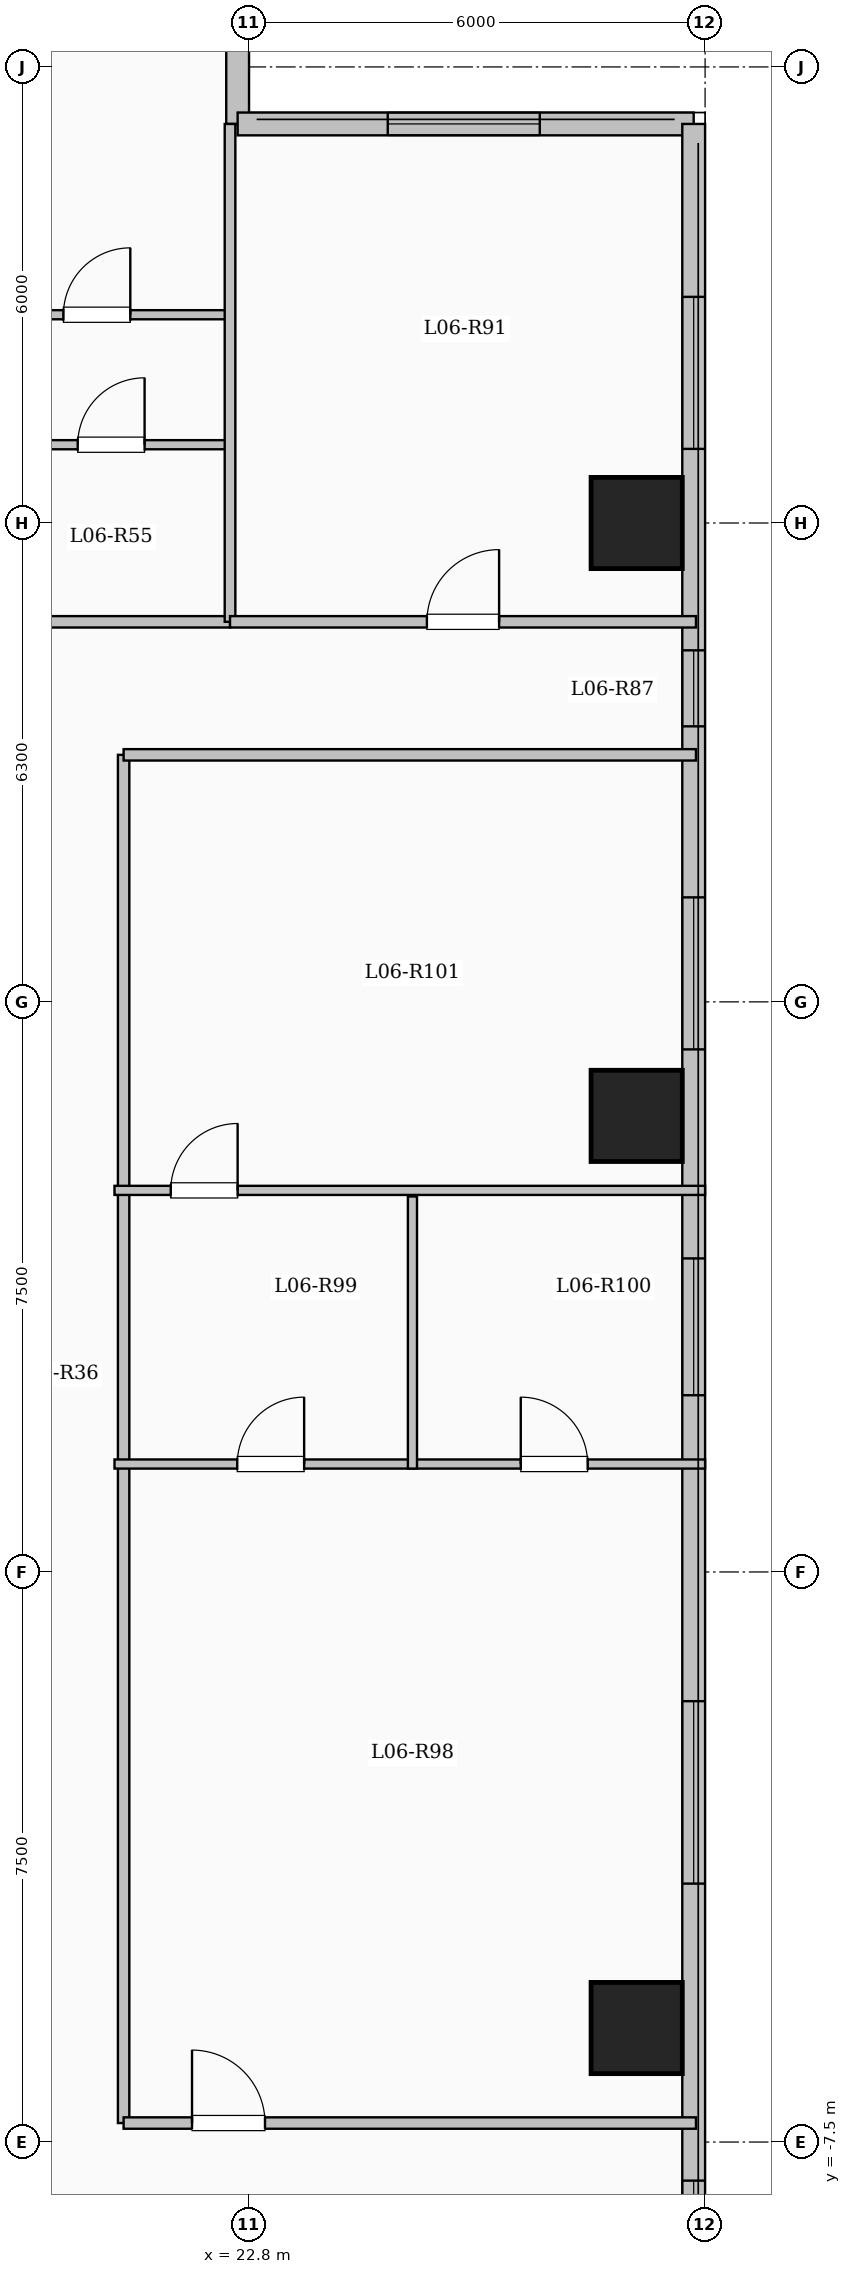
"""IFC4 building model, lengths in metres.
Left out: names, types, materials, properties, quantities, classifications, styles, units other than length and angle.
Written with IfcOpenShell. Run it as: python <this file> out.ifc"""

import sys

from ifc_helpers import new_model, si_unit, direction, frame, frame_2d, origin, origin_2d, place, context, subcontext, project, spatial, rectangle, extrude, element, fill, save


model = new_model("IFC4")
c1 = context("Model", 3, precision=1e-05, world=origin(), true_north=direction((0.0, 1.0)))
c2 = subcontext(c1, "Body", "Model", "MODEL_VIEW")
j1 = project(units=[si_unit("LENGTHUNIT", "METRE"), si_unit("PLANEANGLEUNIT", "RADIAN")], contexts=[c1])
p1 = place(None, origin())
s1 = spatial("IfcSite", under=j1, at=p1, CompositionType="ELEMENT")
p2 = place(p1, origin())
s2 = spatial("IfcBuilding", under=s1, at=p2, CompositionType="ELEMENT")
p3 = place(p2, frame((0.0, 0.0, 27.35)))
s3 = spatial("IfcBuildingStorey", under=s2, at=p3, CompositionType="ELEMENT", Elevation=27.35)
for number, where, z_axis, x_axis in (
    (1, (27.9, -6.0, 0.0), (0.0, 0.0, 1.0), (1.0, 0.0, 0.0)),
    (2, (27.9, 6.0, 0.0), (0.0, 0.0, 1.0), (1.0, 0.0, 0.0)),
    (3, (27.9, 13.8, 0.0), (0.0, 0.0, 1.0), (1.0, 0.0, 0.0)),
):
    element("IfcColumn", number, at=place(p3, frame(where, z_axis=z_axis, x_axis=x_axis)), inside=s3, PredefinedType="COLUMN", context=c2, shape_type="SweptSolid", body=[
        extrude(rectangle(XDim=1.2, YDim=1.2, at=origin_2d()), origin(), (0.0, 0.0, 1.0), 3.35),
    ])
p4 = place(p3, frame((22.65, 23.55, 0.0), z_axis=(0.0, 0.0, 1.0), x_axis=(0.0, -1.0, 0.0)))
e4 = element("IfcWall", 4, at=p4, inside=s3, PredefinedType="SOLIDWALL", context=c2, shape_type="SweptSolid", body=[
    extrude(rectangle(XDim=4.5, YDim=0.3, at=frame_2d((2.25, 0.0))), origin(), (0.0, 0.0, 1.0), 3.1),
])
p5 = place(p4, frame((1.367, 0.0, 0.9)))
e5 = element("IfcOpeningElement", 5, at=p5, cuts=e4, PredefinedType="OPENING", context=c2, shape_type="SweptSolid", body=[
    extrude(rectangle(XDim=1.8, YDim=1.65, at=frame_2d((0.9, 0.825))), frame((0.0, 0.16, 0.0), z_axis=(0.0, -1.0, 0.0), x_axis=(1.0, 0.0, 0.0)), (0.0, 0.0, 1.0), 0.32),
])
p6 = place(p3, frame((22.65, 19.05, 0.0), z_axis=(0.0, 0.0, 1.0), x_axis=(1.0, 0.0, 0.0)))
e6 = element("IfcWall", 6, at=p6, inside=s3, PredefinedType="SOLIDWALL", context=c2, shape_type="SweptSolid", body=[
    extrude(rectangle(XDim=6.0, YDim=0.3, at=frame_2d((3.0, 0.0))), origin(), (0.0, 0.0, 1.0), 3.1),
])
p7 = place(p6, frame((1.975, 0.0, 0.9)))
e7 = element("IfcOpeningElement", 7, at=p7, cuts=e6, PredefinedType="OPENING", context=c2, shape_type="SweptSolid", body=[
    extrude(rectangle(XDim=2.0, YDim=1.7, at=frame_2d((1.0, 0.85))), frame((0.0, 0.16, 0.0), z_axis=(0.0, -1.0, 0.0), x_axis=(1.0, 0.0, 0.0)), (0.0, 0.0, 1.0), 0.32),
])
p8 = place(p3, frame((28.65, 19.05, 0.0), z_axis=(0.0, 0.0, 1.0), x_axis=(0.0, -1.0, 0.0)))
e8 = element("IfcWall", 8, at=p8, inside=s3, PredefinedType="SOLIDWALL", context=c2, shape_type="SweptSolid", body=[
    extrude(rectangle(XDim=38.1, YDim=0.3, at=frame_2d((19.05, 0.0))), origin(), (0.0, 0.0, 1.0), 3.1),
])
p9 = place(p8, frame((2.275, 0.0, 0.9)))
e9 = element("IfcOpeningElement", 9, at=p9, cuts=e8, PredefinedType="OPENING", context=c2, shape_type="SweptSolid", body=[
    extrude(rectangle(XDim=2.0, YDim=1.7, at=frame_2d((1.0, 0.85))), frame((0.0, 0.16, 0.0), z_axis=(0.0, -1.0, 0.0), x_axis=(1.0, 0.0, 0.0)), (0.0, 0.0, 1.0), 0.32),
])
p10 = place(p8, frame((6.925, 0.0, 0.95)))
e10 = element("IfcOpeningElement", 10, at=p10, cuts=e8, PredefinedType="OPENING", context=c2, shape_type="SweptSolid", body=[
    extrude(rectangle(XDim=1.0, YDim=1.5, at=frame_2d((0.5, 0.75))), frame((0.0, 0.16, 0.0), z_axis=(0.0, -1.0, 0.0), x_axis=(1.0, 0.0, 0.0)), (0.0, 0.0, 1.0), 0.32),
])
p11 = place(p8, frame((10.175, 0.0, 0.9)))
e11 = element("IfcOpeningElement", 11, at=p11, cuts=e8, PredefinedType="OPENING", context=c2, shape_type="SweptSolid", body=[
    extrude(rectangle(XDim=2.0, YDim=1.7, at=frame_2d((1.0, 0.85))), frame((0.0, 0.16, 0.0), z_axis=(0.0, -1.0, 0.0), x_axis=(1.0, 0.0, 0.0)), (0.0, 0.0, 1.0), 0.32),
])
p12 = place(p8, frame((14.925, 0.0, 0.9)))
e12 = element("IfcOpeningElement", 12, at=p12, cuts=e8, PredefinedType="OPENING", context=c2, shape_type="SweptSolid", body=[
    extrude(rectangle(XDim=1.8, YDim=1.65, at=frame_2d((0.9, 0.825))), frame((0.0, 0.16, 0.0), z_axis=(0.0, -1.0, 0.0), x_axis=(1.0, 0.0, 0.0)), (0.0, 0.0, 1.0), 0.32),
])
p13 = place(p8, frame((20.75, 0.0, 0.9)))
e13 = element("IfcOpeningElement", 13, at=p13, cuts=e8, PredefinedType="OPENING", context=c2, shape_type="SweptSolid", body=[
    extrude(rectangle(XDim=2.4, YDim=1.8, at=frame_2d((1.2, 0.9))), frame((0.0, 0.16, 0.0), z_axis=(0.0, -1.0, 0.0), x_axis=(1.0, 0.0, 0.0)), (0.0, 0.0, 1.0), 0.32),
])
p14 = place(p8, frame((27.058, 0.0, 0.9)))
e14 = element("IfcOpeningElement", 14, at=p14, cuts=e8, PredefinedType="OPENING", context=c2, shape_type="SweptSolid", body=[
    extrude(rectangle(XDim=1.5, YDim=1.65, at=frame_2d((0.75, 0.825))), frame((0.0, 0.16, 0.0), z_axis=(0.0, -1.0, 0.0), x_axis=(1.0, 0.0, 0.0)), (0.0, 0.0, 1.0), 0.32),
])
p15 = place(p8, frame((32.55, 0.0, 0.9)))
e15 = element("IfcOpeningElement", 15, at=p15, cuts=e8, PredefinedType="OPENING", context=c2, shape_type="SweptSolid", body=[
    extrude(rectangle(XDim=2.4, YDim=1.8, at=frame_2d((1.2, 0.9))), frame((0.0, 0.16, 0.0), z_axis=(0.0, -1.0, 0.0), x_axis=(1.0, 0.0, 0.0)), (0.0, 0.0, 1.0), 0.32),
])
p16 = place(p3, frame((3.85, 12.5, 0.0), z_axis=(0.0, 0.0, 1.0), x_axis=(1.0, 0.0, 0.0)))
e16 = element("IfcWall", 16, at=p16, inside=s3, PredefinedType="PARTITIONING", context=c2, shape_type="SweptSolid", body=[
    extrude(rectangle(XDim=18.7, YDim=0.15, at=frame_2d((9.35, 0.0))), origin(), (0.0, 0.0, 1.0), 3.1),
])
p17 = place(p16, frame((0.7, 0.0, 0.0)))
e17 = element("IfcOpeningElement", 17, at=p17, cuts=e16, PredefinedType="OPENING", context=c2, shape_type="SweptSolid", body=[
    extrude(rectangle(XDim=0.96, YDim=2.15, at=frame_2d((0.48, 1.075))), frame((0.0, 0.085, 0.0), z_axis=(0.0, -1.0, 0.0), x_axis=(1.0, 0.0, 0.0)), (0.0, 0.0, 1.0), 0.17),
])
p18 = place(p16, frame((8.4, 0.0, 0.0)))
e18 = element("IfcOpeningElement", 18, at=p18, cuts=e16, PredefinedType="OPENING", context=c2, shape_type="SweptSolid", body=[
    extrude(rectangle(XDim=0.96, YDim=2.15, at=frame_2d((0.48, 1.075))), frame((0.0, 0.085, 0.0), z_axis=(0.0, -1.0, 0.0), x_axis=(1.0, 0.0, 0.0)), (0.0, 0.0, 1.0), 0.17),
])
p19 = place(p3, frame((21.15, -7.25, 0.0), z_axis=(0.0, 0.0, 1.0), x_axis=(0.0, 1.0, 0.0)))
e19 = element("IfcWall", 19, at=p19, inside=s3, PredefinedType="PARTITIONING", context=c2, shape_type="SweptSolid", body=[
    extrude(rectangle(XDim=18.0, YDim=0.15, at=frame_2d((9.0, 0.0))), origin(), (0.0, 0.0, 1.0), 2.585),
])
p20 = place(p3, frame((19.422, 14.83, 0.0), z_axis=(0.0, 0.0, 1.0), x_axis=(1.0, 0.0, 0.0)))
e20 = element("IfcWall", 20, at=p20, inside=s3, PredefinedType="PARTITIONING", context=c2, shape_type="SweptSolid", body=[
    extrude(rectangle(XDim=3.128, YDim=0.12, at=frame_2d((1.564, 0.0))), origin(), (0.0, 0.0, 1.0), 3.1),
])
p21 = place(p20, frame((1.124, 0.0, 0.0)))
e21 = element("IfcOpeningElement", 21, at=p21, cuts=e20, PredefinedType="OPENING", context=c2, shape_type="SweptSolid", body=[
    extrude(rectangle(XDim=0.88, YDim=2.1, at=frame_2d((0.44, 1.05))), frame((0.0, 0.07, 0.0), z_axis=(0.0, -1.0, 0.0), x_axis=(1.0, 0.0, 0.0)), (0.0, 0.0, 1.0), 0.14),
])
p22 = place(p3, frame((15.902, 16.54, 0.0), z_axis=(0.0, 0.0, 1.0), x_axis=(1.0, 0.0, 0.0)))
e22 = element("IfcWall", 22, at=p22, inside=s3, PredefinedType="PARTITIONING", context=c2, shape_type="SweptSolid", body=[
    extrude(rectangle(XDim=6.708, YDim=0.12, at=frame_2d((3.354, 0.0))), origin(), (0.0, 0.0, 1.0), 3.1),
])
p23 = place(p22, frame((1.192, 0.0, 0.0)))
e23 = element("IfcOpeningElement", 23, at=p23, cuts=e22, PredefinedType="OPENING", context=c2, shape_type="SweptSolid", body=[
    extrude(rectangle(XDim=0.88, YDim=2.1, at=frame_2d((0.44, 1.05))), frame((0.0, 0.07, 0.0), z_axis=(0.0, -1.0, 0.0), x_axis=(1.0, 0.0, 0.0)), (0.0, 0.0, 1.0), 0.14),
])
p24 = place(p22, frame((4.456, 0.0, 0.0)))
e24 = element("IfcOpeningElement", 24, at=p24, cuts=e22, PredefinedType="OPENING", context=c2, shape_type="SweptSolid", body=[
    extrude(rectangle(XDim=0.88, YDim=2.1, at=frame_2d((0.44, 1.05))), frame((0.0, 0.07, 0.0), z_axis=(0.0, -1.0, 0.0), x_axis=(1.0, 0.0, 0.0)), (0.0, 0.0, 1.0), 0.14),
])
p25 = place(p3, frame((21.15, -7.25, 0.0), z_axis=(0.0, 0.0, 1.0), x_axis=(1.0, 0.0, 0.0)))
e25 = element("IfcWall", 25, at=p25, inside=s3, PredefinedType="PARTITIONING", context=c2, shape_type="SweptSolid", body=[
    extrude(rectangle(XDim=7.53, YDim=0.15, at=frame_2d((3.765, 0.0))), origin(), (0.0, 0.0, 1.0), 3.1),
])
p26 = place(p25, frame((0.9, 0.0, 0.0)))
e26 = element("IfcOpeningElement", 26, at=p26, cuts=e25, PredefinedType="OPENING", context=c2, shape_type="SweptSolid", body=[
    extrude(rectangle(XDim=0.96, YDim=2.15, at=frame_2d((0.48, 1.075))), frame((0.0, 0.085, 0.0), z_axis=(0.0, -1.0, 0.0), x_axis=(1.0, 0.0, 0.0)), (0.0, 0.0, 1.0), 0.17),
])
p27 = place(p3, frame((21.15, 10.75, 0.0), z_axis=(0.0, 0.0, 1.0), x_axis=(1.0, 0.0, 0.0)))
e27 = element("IfcWall", 27, at=p27, inside=s3, PredefinedType="PARTITIONING", context=c2, shape_type="SweptSolid", body=[
    extrude(rectangle(XDim=7.53, YDim=0.15, at=frame_2d((3.765, 0.0))), origin(), (0.0, 0.0, 1.0), 3.1),
])
p28 = place(p3, frame((22.55, 12.5, 0.0), z_axis=(0.0, 0.0, 1.0), x_axis=(0.0, 1.0, 0.0)))
e28 = element("IfcWall", 28, at=p28, inside=s3, PredefinedType="PARTITIONING", context=c2, shape_type="SweptSolid", body=[
    extrude(rectangle(XDim=6.55, YDim=0.14, at=frame_2d((3.275, 0.0))), origin(), (0.0, 0.0, 1.0), 3.1),
])
p29 = place(p3, frame((22.55, 12.5, 0.0), z_axis=(0.0, 0.0, 1.0), x_axis=(1.0, 0.0, 0.0)))
e29 = element("IfcWall", 29, at=p29, inside=s3, PredefinedType="PARTITIONING", context=c2, shape_type="SweptSolid", body=[
    extrude(rectangle(XDim=6.13, YDim=0.15, at=frame_2d((3.065, 0.0))), origin(), (0.0, 0.0, 1.0), 3.1),
])
p30 = place(p29, frame((2.59, 0.0, 0.0)))
e30 = element("IfcOpeningElement", 30, at=p30, cuts=e29, PredefinedType="OPENING", context=c2, shape_type="SweptSolid", body=[
    extrude(rectangle(XDim=0.95, YDim=2.15, at=frame_2d((0.475, 1.075))), frame((0.0, 0.085, 0.0), z_axis=(0.0, -1.0, 0.0), x_axis=(1.0, 0.0, 0.0)), (0.0, 0.0, 1.0), 0.17),
])
p31 = place(p3, frame((21.03, 1.42, 0.0), z_axis=(0.0, 0.0, 1.0), x_axis=(1.0, 0.0, 0.0)))
e31 = element("IfcWall", 31, at=p31, inside=s3, PredefinedType="PARTITIONING", context=c2, shape_type="SweptSolid", body=[
    extrude(rectangle(XDim=7.77, YDim=0.12, at=frame_2d((3.885, 0.0))), origin(), (0.0, 0.0, 1.0), 3.1),
])
p32 = place(p31, frame((1.615, 0.0, 0.0)))
e32 = element("IfcOpeningElement", 32, at=p32, cuts=e31, PredefinedType="OPENING", context=c2, shape_type="SweptSolid", body=[
    extrude(rectangle(XDim=0.88, YDim=2.1, at=frame_2d((0.44, 1.05))), frame((0.0, 0.07, 0.0), z_axis=(0.0, -1.0, 0.0), x_axis=(1.0, 0.0, 0.0)), (0.0, 0.0, 1.0), 0.14),
])
p33 = place(p31, frame((5.345, 0.0, 0.0)))
e33 = element("IfcOpeningElement", 33, at=p33, cuts=e31, PredefinedType="OPENING", context=c2, shape_type="SweptSolid", body=[
    extrude(rectangle(XDim=0.88, YDim=2.1, at=frame_2d((0.44, 1.05))), frame((0.0, 0.07, 0.0), z_axis=(0.0, -1.0, 0.0), x_axis=(1.0, 0.0, 0.0)), (0.0, 0.0, 1.0), 0.14),
])
p34 = place(p3, frame((21.03, 5.02, 0.0), z_axis=(0.0, 0.0, 1.0), x_axis=(1.0, 0.0, 0.0)))
e34 = element("IfcWall", 34, at=p34, inside=s3, PredefinedType="PARTITIONING", context=c2, shape_type="SweptSolid", body=[
    extrude(rectangle(XDim=7.77, YDim=0.12, at=frame_2d((3.885, 0.0))), origin(), (0.0, 0.0, 1.0), 3.1),
])
p35 = place(p34, frame((0.74, 0.0, 0.0)))
e35 = element("IfcOpeningElement", 35, at=p35, cuts=e34, PredefinedType="OPENING", context=c2, shape_type="SweptSolid", body=[
    extrude(rectangle(XDim=0.88, YDim=2.1, at=frame_2d((0.44, 1.05))), frame((0.0, 0.07, 0.0), z_axis=(0.0, -1.0, 0.0), x_axis=(1.0, 0.0, 0.0)), (0.0, 0.0, 1.0), 0.14),
])
p36 = place(p3, frame((24.95, 1.36, 0.0), z_axis=(0.0, 0.0, 1.0), x_axis=(0.0, 1.0, 0.0)))
e36 = element("IfcWall", 36, at=p36, inside=s3, PredefinedType="PARTITIONING", context=c2, shape_type="SweptSolid", body=[
    extrude(rectangle(XDim=3.58, YDim=0.12, at=frame_2d((1.79, 0.0))), origin(), (0.0, 0.0, 1.0), 3.1),
])
p37 = place(p7, origin())
e37 = element("IfcWindow", 37, at=p37, inside=s3, PartitioningType="SINGLE_PANEL", PredefinedType="WINDOW", context=c2, shape_type="SweptSolid", body=[
    extrude(rectangle(XDim=2.0, YDim=1.7, at=frame_2d((1.0, 0.85))), frame((0.0, 0.03, 0.0), z_axis=(0.0, -1.0, 0.0), x_axis=(1.0, 0.0, 0.0)), (0.0, 0.0, 1.0), 0.06),
])
fill(e7, e37)
p38 = place(p9, origin())
e38 = element("IfcWindow", 38, at=p38, inside=s3, PartitioningType="SINGLE_PANEL", PredefinedType="WINDOW", context=c2, shape_type="SweptSolid", body=[
    extrude(rectangle(XDim=2.0, YDim=1.7, at=frame_2d((1.0, 0.85))), frame((0.0, 0.03, 0.0), z_axis=(0.0, -1.0, 0.0), x_axis=(1.0, 0.0, 0.0)), (0.0, 0.0, 1.0), 0.06),
])
fill(e9, e38)
p39 = place(p10, origin())
e39 = element("IfcWindow", 39, at=p39, inside=s3, PartitioningType="SINGLE_PANEL", PredefinedType="WINDOW", context=c2, shape_type="SweptSolid", body=[
    extrude(rectangle(XDim=1.0, YDim=1.5, at=frame_2d((0.5, 0.75))), frame((0.0, 0.03, 0.0), z_axis=(0.0, -1.0, 0.0), x_axis=(1.0, 0.0, 0.0)), (0.0, 0.0, 1.0), 0.06),
])
fill(e10, e39)
p40 = place(p11, origin())
e40 = element("IfcWindow", 40, at=p40, inside=s3, PartitioningType="SINGLE_PANEL", PredefinedType="WINDOW", context=c2, shape_type="SweptSolid", body=[
    extrude(rectangle(XDim=2.0, YDim=1.7, at=frame_2d((1.0, 0.85))), frame((0.0, 0.03, 0.0), z_axis=(0.0, -1.0, 0.0), x_axis=(1.0, 0.0, 0.0)), (0.0, 0.0, 1.0), 0.06),
])
fill(e11, e40)
p41 = place(p12, origin())
e41 = element("IfcWindow", 41, at=p41, inside=s3, PartitioningType="SINGLE_PANEL", PredefinedType="WINDOW", context=c2, shape_type="SweptSolid", body=[
    extrude(rectangle(XDim=1.8, YDim=1.65, at=frame_2d((0.9, 0.825))), frame((0.0, 0.03, 0.0), z_axis=(0.0, -1.0, 0.0), x_axis=(1.0, 0.0, 0.0)), (0.0, 0.0, 1.0), 0.06),
])
fill(e12, e41)
p42 = place(p13, origin())
e42 = element("IfcWindow", 42, at=p42, inside=s3, PartitioningType="SINGLE_PANEL", PredefinedType="WINDOW", context=c2, shape_type="SweptSolid", body=[
    extrude(rectangle(XDim=2.4, YDim=1.8, at=frame_2d((1.2, 0.9))), frame((0.0, 0.03, 0.0), z_axis=(0.0, -1.0, 0.0), x_axis=(1.0, 0.0, 0.0)), (0.0, 0.0, 1.0), 0.06),
])
fill(e13, e42)
p43 = place(p14, origin())
e43 = element("IfcWindow", 43, at=p43, inside=s3, PartitioningType="SINGLE_PANEL", PredefinedType="WINDOW", context=c2, shape_type="SweptSolid", body=[
    extrude(rectangle(XDim=1.5, YDim=1.65, at=frame_2d((0.75, 0.825))), frame((0.0, 0.03, 0.0), z_axis=(0.0, -1.0, 0.0), x_axis=(1.0, 0.0, 0.0)), (0.0, 0.0, 1.0), 0.06),
])
fill(e14, e43)
p44 = place(p21, origin())
e44 = element("IfcDoor", 44, at=p44, inside=s3, OperationType="SINGLE_SWING_RIGHT", PredefinedType="DOOR", context=c2, shape_type="SweptSolid", body=[
    extrude(rectangle(XDim=0.88, YDim=2.1, at=frame_2d((0.44, 1.05))), frame((0.0, 0.025, 0.0), z_axis=(0.0, -1.0, 0.0), x_axis=(1.0, 0.0, 0.0)), (0.0, 0.0, 1.0), 0.05),
])
fill(e21, e44)
p45 = place(p24, origin())
e45 = element("IfcDoor", 45, at=p45, inside=s3, OperationType="SINGLE_SWING_RIGHT", PredefinedType="DOOR", context=c2, shape_type="SweptSolid", body=[
    extrude(rectangle(XDim=0.88, YDim=2.1, at=frame_2d((0.44, 1.05))), frame((0.0, 0.025, 0.0), z_axis=(0.0, -1.0, 0.0), x_axis=(1.0, 0.0, 0.0)), (0.0, 0.0, 1.0), 0.05),
])
fill(e24, e45)
p46 = place(p30, origin())
e46 = element("IfcDoor", 46, at=p46, inside=s3, OperationType="SINGLE_SWING_RIGHT", PredefinedType="DOOR", context=c2, shape_type="SweptSolid", body=[
    extrude(rectangle(XDim=0.95, YDim=2.15, at=frame_2d((0.475, 1.075))), frame((0.0, 0.025, 0.0), z_axis=(0.0, -1.0, 0.0), x_axis=(1.0, 0.0, 0.0)), (0.0, 0.0, 1.0), 0.05),
])
fill(e30, e46)
p47 = place(p26, origin())
e47 = element("IfcDoor", 47, at=p47, inside=s3, OperationType="SINGLE_SWING_LEFT", PredefinedType="DOOR", context=c2, shape_type="SweptSolid", body=[
    extrude(rectangle(XDim=0.96, YDim=2.15, at=frame_2d((0.48, 1.075))), frame((0.0, 0.025, 0.0), z_axis=(0.0, -1.0, 0.0), x_axis=(1.0, 0.0, 0.0)), (0.0, 0.0, 1.0), 0.05),
])
fill(e26, e47)
p48 = place(p32, origin())
e48 = element("IfcDoor", 48, at=p48, inside=s3, OperationType="SINGLE_SWING_RIGHT", PredefinedType="DOOR", context=c2, shape_type="SweptSolid", body=[
    extrude(rectangle(XDim=0.88, YDim=2.1, at=frame_2d((0.44, 1.05))), frame((0.0, 0.025, 0.0), z_axis=(0.0, -1.0, 0.0), x_axis=(1.0, 0.0, 0.0)), (0.0, 0.0, 1.0), 0.05),
])
fill(e32, e48)
p49 = place(p33, origin())
e49 = element("IfcDoor", 49, at=p49, inside=s3, OperationType="SINGLE_SWING_LEFT", PredefinedType="DOOR", context=c2, shape_type="SweptSolid", body=[
    extrude(rectangle(XDim=0.88, YDim=2.1, at=frame_2d((0.44, 1.05))), frame((0.0, 0.025, 0.0), z_axis=(0.0, -1.0, 0.0), x_axis=(1.0, 0.0, 0.0)), (0.0, 0.0, 1.0), 0.05),
])
fill(e33, e49)
p50 = place(p35, origin())
e50 = element("IfcDoor", 50, at=p50, inside=s3, OperationType="SINGLE_SWING_RIGHT", PredefinedType="DOOR", context=c2, shape_type="SweptSolid", body=[
    extrude(rectangle(XDim=0.88, YDim=2.1, at=frame_2d((0.44, 1.05))), frame((0.0, 0.025, 0.0), z_axis=(0.0, -1.0, 0.0), x_axis=(1.0, 0.0, 0.0)), (0.0, 0.0, 1.0), 0.05),
])
fill(e35, e50)
save(model, sys.argv[1])
